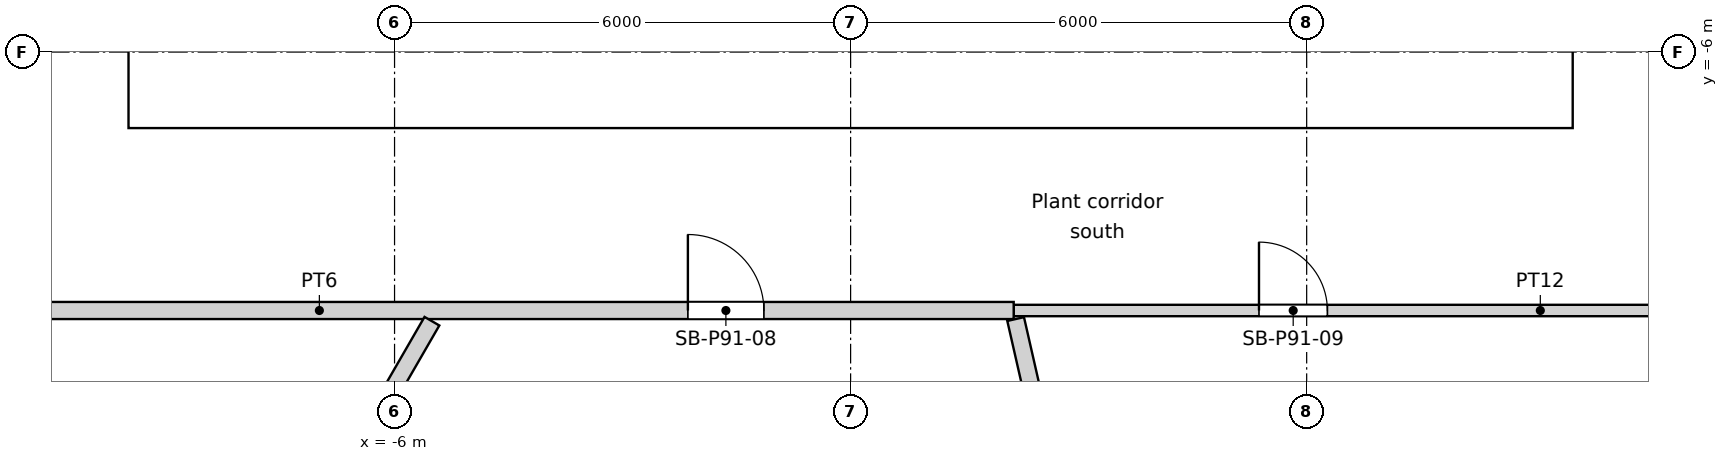
"""IFC4 building model, lengths in metres.
Left out: names, types, materials, properties, quantities, classifications, styles, units other than length and angle.
Written with IfcOpenShell. Run it as: python <this file> out.ifc"""

import sys

from ifc_helpers import new_model, si_unit, direction, frame, frame_2d, origin, place, context, subcontext, project, spatial, rectangle, extrude, element, fill, save


model = new_model("IFC4")
c1 = context("Model", 3, precision=1e-05, world=origin(), true_north=direction((0.0, 1.0)))
c2 = subcontext(c1, "Body", "Model", "MODEL_VIEW")
j1 = project(units=[si_unit("LENGTHUNIT", "METRE"), si_unit("PLANEANGLEUNIT", "RADIAN")], contexts=[c1])
p1 = place(None, origin())
s1 = spatial("IfcSite", under=j1, at=p1, CompositionType="ELEMENT")
p2 = place(p1, origin())
s2 = spatial("IfcBuilding", under=s1, at=p2, CompositionType="ELEMENT")
p3 = place(p2, frame((0.0, 0.0, 358.2)))
s3 = spatial("IfcBuildingStorey", under=s2, at=p3, CompositionType="ELEMENT", Elevation=358.2)
p4 = place(p3, frame((-9.5, -6.7, 0.0), z_axis=(0.0, 0.0, 1.0), x_axis=(1.0, 0.0, 0.0)))
e1 = element("IfcWall", 1, at=p4, inside=s3, PredefinedType="SOLIDWALL", context=c2, shape_type="SweptSolid", body=[
    extrude(rectangle(XDim=19.0, YDim=0.6, at=frame_2d((9.5, 0.0))), origin(), (0.0, 0.0, 1.0), 5.6),
])
p5 = place(p4, frame((10.4, 0.0, 0.0)))
e2 = element("IfcOpeningElement", 2, at=p5, cuts=e1, PredefinedType="OPENING", context=c2, shape_type="SweptSolid", body=[
    extrude(rectangle(XDim=1.0, YDim=2.1, at=frame_2d((0.5, 1.05))), frame((0.0, 0.3, 0.0), z_axis=(0.0, -1.0, 0.0), x_axis=(1.0, 0.0, 0.0)), (0.0, 0.0, 1.0), 0.6),
])
p6 = place(p4, frame((5.35, 0.0, 0.0)))
e3 = element("IfcOpeningElement", 3, at=p6, cuts=e1, PredefinedType="OPENING", context=c2, shape_type="SweptSolid", body=[
    extrude(rectangle(XDim=1.7, YDim=2.1, at=frame_2d((0.85, 1.05))), frame((0.0, 0.3, 0.0), z_axis=(0.0, -1.0, 0.0), x_axis=(1.0, 0.0, 0.0)), (0.0, 0.0, 1.0), 0.6),
])
p7 = place(p4, frame((11.95, 0.0, 0.0)))
e4 = element("IfcOpeningElement", 4, at=p7, cuts=e1, PredefinedType="OPENING", context=c2, shape_type="SweptSolid", body=[
    extrude(rectangle(XDim=1.7, YDim=2.1, at=frame_2d((0.85, 1.05))), frame((0.0, 0.3, 0.0), z_axis=(0.0, -1.0, 0.0), x_axis=(1.0, 0.0, 0.0)), (0.0, 0.0, 1.0), 0.6),
])
p8 = place(p3, frame((-9.2, -6.4, 0.0), z_axis=(0.0, 0.0, 1.0), x_axis=(0.0, 1.0, 0.0)))
e5 = element("IfcWall", 5, at=p8, inside=s3, PredefinedType="SOLIDWALL", context=c2, shape_type="SweptSolid", body=[
    extrude(rectangle(XDim=12.8, YDim=0.6, at=frame_2d((6.4, 0.0))), origin(), (0.0, 0.0, 1.0), 5.6),
])
p9 = place(p3, frame((9.2, -6.4, 0.0), z_axis=(0.0, 0.0, 1.0), x_axis=(0.0, 1.0, 0.0)))
e6 = element("IfcWall", 6, at=p9, inside=s3, PredefinedType="SOLIDWALL", context=c2, shape_type="SweptSolid", body=[
    extrude(rectangle(XDim=12.8, YDim=0.6, at=frame_2d((6.4, 0.0))), origin(), (0.0, 0.0, 1.0), 5.6),
])
p10 = place(p9, frame((6.4, 0.0, 0.0)))
e7 = element("IfcOpeningElement", 7, at=p10, cuts=e6, PredefinedType="OPENING", context=c2, shape_type="SweptSolid", body=[
    extrude(rectangle(XDim=1.8, YDim=2.1, at=frame_2d((0.9, 1.05))), frame((0.0, 0.3, 0.0), z_axis=(0.0, -1.0, 0.0), x_axis=(1.0, 0.0, 0.0)), (0.0, 0.0, 1.0), 0.6),
])
for number, where, z_axis, x_axis in (
    (8, (-2.25, -6.4, 0.0), (0.0, 0.0, 1.0), (0.0, 1.0, 0.0)),
    (9, (0.55, -6.4, 0.0), (0.0, 0.0, 1.0), (0.0, 1.0, 0.0)),
    (10, (2.25, -6.4, 0.0), (0.0, 0.0, 1.0), (0.0, 1.0, 0.0)),
):
    element("IfcWall", number, at=place(p3, frame(where, z_axis=z_axis, x_axis=x_axis)), inside=s3, PredefinedType="SOLIDWALL", context=c2, shape_type="SweptSolid", body=[
        extrude(rectangle(XDim=3.15, YDim=0.3, at=frame_2d((1.575, 0.0))), origin(), (0.0, 0.0, 1.0), 5.6),
    ])
p11 = place(p3, frame((-11.788, -9.4, 0.0), z_axis=(0.0, 0.0, 1.0), x_axis=(1.0, 0.0, 0.0)))
e11 = element("IfcWall", 11, at=p11, inside=s3, PredefinedType="PARTITIONING", context=c2, shape_type="SweptSolid", body=[
    extrude(rectangle(XDim=13.933, YDim=0.225, at=frame_2d((6.967, 0.0))), origin(), (0.0, 0.0, 1.0), 5.15),
])
p12 = place(p11, frame((9.647, 0.0, 0.0)))
e12 = element("IfcOpeningElement", 12, at=p12, cuts=e11, PredefinedType="OPENING", context=c2, shape_type="SweptSolid", body=[
    extrude(rectangle(XDim=1.0, YDim=2.1, at=frame_2d((0.5, 1.05))), frame((0.0, 0.113, 0.0), z_axis=(0.0, -1.0, 0.0), x_axis=(1.0, 0.0, 0.0)), (0.0, 0.0, 1.0), 0.225),
])
p13 = place(p3, frame((-8.386, -14.524, 0.0), z_axis=(0.0, 0.0, 1.0), x_axis=(0.499999096538, 0.866025925398, 0.0)))
e13 = element("IfcWall", 13, at=p13, inside=s3, PredefinedType="PARTITIONING", context=c2, shape_type="SweptSolid", body=[
    extrude(rectangle(XDim=5.755, YDim=0.225, at=frame_2d((2.877, 0.0))), origin(), (0.0, 0.0, 1.0), 5.15),
])
p14 = place(p3, frame((2.146, -9.4, 0.0), z_axis=(0.0, 0.0, 1.0), x_axis=(1.0, 0.0, 0.0)))
e14 = element("IfcWall", 14, at=p14, inside=s3, PredefinedType="PARTITIONING", context=c2, shape_type="SweptSolid", body=[
    extrude(rectangle(XDim=9.679, YDim=0.15, at=frame_2d((4.84, 0.0))), origin(), (0.0, 0.0, 1.0), 5.15),
])
p15 = place(p14, frame((3.227, 0.0, 0.0)))
e15 = element("IfcOpeningElement", 15, at=p15, cuts=e14, PredefinedType="OPENING", context=c2, shape_type="SweptSolid", body=[
    extrude(rectangle(XDim=0.9, YDim=2.1, at=frame_2d((0.45, 1.05))), frame((0.0, 0.075, 0.0), z_axis=(0.0, -1.0, 0.0), x_axis=(1.0, 0.0, 0.0)), (0.0, 0.0, 1.0), 0.15),
])
p16 = place(p3, frame((3.732, -16.351, 0.0), z_axis=(0.0, 0.0, 1.0), x_axis=(-0.222517634997, 0.974928665142, 0.0)))
e16 = element("IfcWall", 16, at=p16, inside=s3, PredefinedType="PARTITIONING", context=c2, shape_type="SweptSolid", body=[
    extrude(rectangle(XDim=7.014, YDim=0.225, at=frame_2d((3.507, 0.0))), origin(), (0.0, 0.0, 1.0), 5.15),
])
p17 = place(p5, origin())
e17 = element("IfcDoor", 17, at=p17, inside=s3, OperationType="SINGLE_SWING_LEFT", PredefinedType="DOOR", context=c2, shape_type="SweptSolid", body=[
    extrude(rectangle(XDim=1.0, YDim=2.1, at=frame_2d((0.5, 1.05))), frame((0.0, 0.025, 0.0), z_axis=(0.0, -1.0, 0.0), x_axis=(1.0, 0.0, 0.0)), (0.0, 0.0, 1.0), 0.05),
])
fill(e2, e17)
p18 = place(p6, origin())
e18 = element("IfcDoor", 18, at=p18, inside=s3, OperationType="DOUBLE_DOOR_SINGLE_SWING", PredefinedType="DOOR", context=c2, shape_type="SweptSolid", body=[
    extrude(rectangle(XDim=1.7, YDim=2.1, at=frame_2d((0.85, 1.05))), frame((0.0, 0.025, 0.0), z_axis=(0.0, -1.0, 0.0), x_axis=(1.0, 0.0, 0.0)), (0.0, 0.0, 1.0), 0.05),
])
fill(e3, e18)
p19 = place(p7, origin())
e19 = element("IfcDoor", 19, at=p19, inside=s3, OperationType="DOUBLE_DOOR_SINGLE_SWING", PredefinedType="DOOR", context=c2, shape_type="SweptSolid", body=[
    extrude(rectangle(XDim=1.7, YDim=2.1, at=frame_2d((0.85, 1.05))), frame((0.0, 0.025, 0.0), z_axis=(0.0, -1.0, 0.0), x_axis=(1.0, 0.0, 0.0)), (0.0, 0.0, 1.0), 0.05),
])
fill(e4, e19)
p20 = place(p12, origin())
e20 = element("IfcDoor", 20, at=p20, inside=s3, OperationType="SINGLE_SWING_LEFT", PredefinedType="DOOR", context=c2, shape_type="SweptSolid", body=[
    extrude(rectangle(XDim=1.0, YDim=2.1, at=frame_2d((0.5, 1.05))), frame((0.0, 0.025, 0.0), z_axis=(0.0, -1.0, 0.0), x_axis=(1.0, 0.0, 0.0)), (0.0, 0.0, 1.0), 0.05),
])
fill(e12, e20)
p21 = place(p15, origin())
e21 = element("IfcDoor", 21, at=p21, inside=s3, OperationType="SINGLE_SWING_LEFT", PredefinedType="DOOR", context=c2, shape_type="SweptSolid", body=[
    extrude(rectangle(XDim=0.9, YDim=2.1, at=frame_2d((0.45, 1.05))), frame((0.0, 0.025, 0.0), z_axis=(0.0, -1.0, 0.0), x_axis=(1.0, 0.0, 0.0)), (0.0, 0.0, 1.0), 0.05),
])
fill(e15, e21)
save(model, sys.argv[1])
